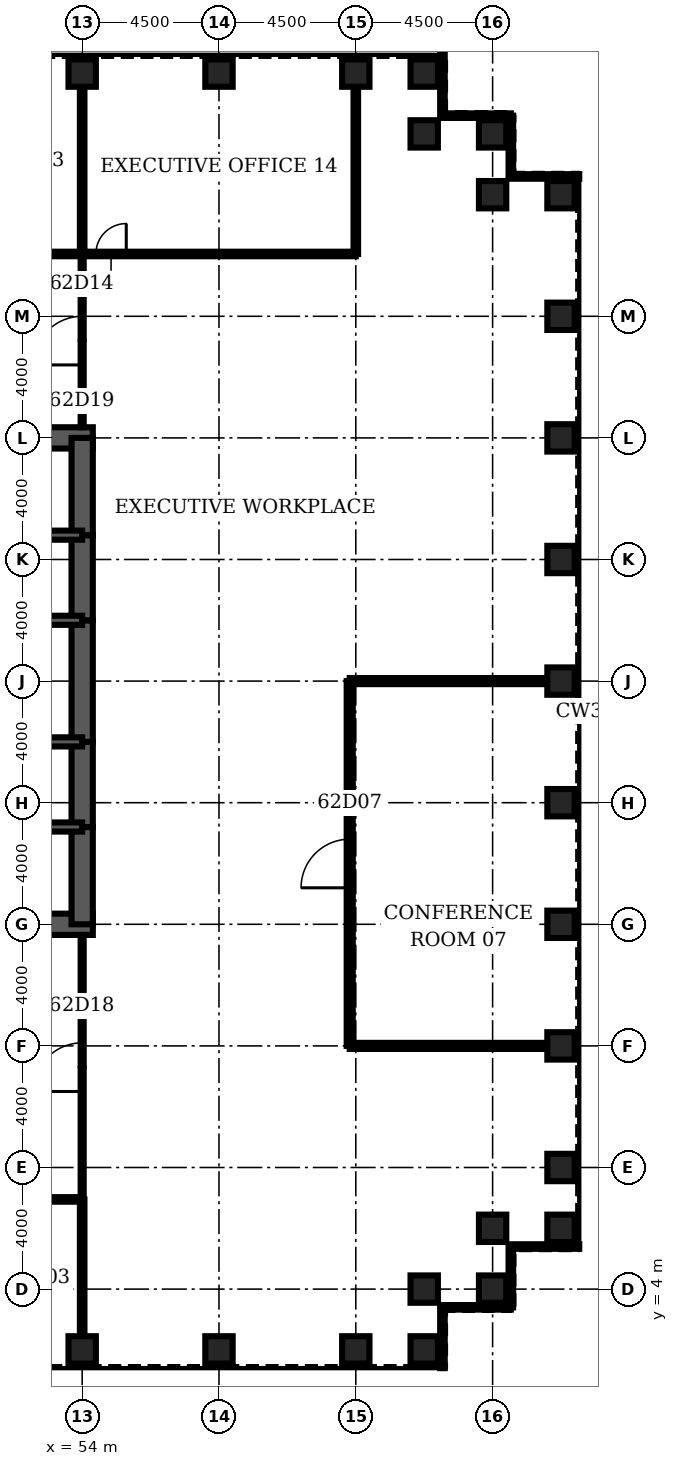
"""IFC4 building model, lengths in metres.
Left out: names, types, materials, properties, quantities, classifications, styles, units other than length and angle.
Written with IfcOpenShell. Run it as: python <this file> out.ifc"""

import sys

from ifc_helpers import new_model, si_unit, direction, frame, frame_2d, origin, origin_2d, place, context, subcontext, project, spatial, rectangle, hollow_rectangle, extrude, element, fill, save


model = new_model("IFC4")
c1 = context("Model", 3, precision=1e-05, world=origin(), true_north=direction((0.0, 1.0)))
c2 = subcontext(c1, "Body", "Model", "MODEL_VIEW")
j1 = project(units=[si_unit("LENGTHUNIT", "METRE"), si_unit("PLANEANGLEUNIT", "RADIAN")], contexts=[c1])
p1 = place(None, origin())
s1 = spatial("IfcSite", under=j1, at=p1, CompositionType="ELEMENT")
p2 = place(p1, origin())
s2 = spatial("IfcBuilding", under=s1, at=p2, CompositionType="ELEMENT")
p3 = place(p2, frame((0.0, 0.0, 275.3)))
s3 = spatial("IfcBuildingStorey", under=s2, at=p3, CompositionType="ELEMENT", Elevation=275.3)
for number, where, z_axis, x_axis in (
    (1, (54.0, 2.0, 0.0), (0.0, 0.0, 1.0), (0.0, 1.0, 0.0)),
    (2, (58.5, 2.0, 0.0), (0.0, 0.0, 1.0), (0.0, 1.0, 0.0)),
    (3, (63.0, 2.0, 0.0), (0.0, 0.0, 1.0), (0.0, 1.0, 0.0)),
    (4, (65.25, 2.0, 0.0), (0.0, 0.0, 1.0), (0.0, 1.0, 0.0)),
    (5, (65.25, 4.0, 0.0), (0.0, 0.0, 1.0), (0.0, 1.0, 0.0)),
    (6, (67.5, 4.0, 0.0), (0.0, 0.0, 1.0), (1.0, 0.0, 0.0)),
    (7, (67.5, 6.0, 0.0), (0.0, 0.0, 1.0), (1.0, 0.0, 0.0)),
    (8, (69.75, 6.0, 0.0), (0.0, 0.0, 1.0), (1.0, 0.0, 0.0)),
    (9, (69.75, 8.0, 0.0), (0.0, 0.0, 1.0), (1.0, 0.0, 0.0)),
    (10, (69.75, 12.0, 0.0), (0.0, 0.0, 1.0), (1.0, 0.0, 0.0)),
    (11, (69.75, 16.0, 0.0), (0.0, 0.0, 1.0), (1.0, 0.0, 0.0)),
    (12, (69.75, 20.0, 0.0), (0.0, 0.0, 1.0), (1.0, 0.0, 0.0)),
    (13, (69.75, 24.0, 0.0), (0.0, 0.0, 1.0), (1.0, 0.0, 0.0)),
    (14, (69.75, 28.0, 0.0), (0.0, 0.0, 1.0), (1.0, 0.0, 0.0)),
    (15, (69.75, 32.0, 0.0), (0.0, 0.0, 1.0), (1.0, 0.0, 0.0)),
    (16, (69.75, 36.0, 0.0), (0.0, 0.0, 1.0), (1.0, 0.0, 0.0)),
    (17, (69.75, 40.0, 0.0), (0.0, 0.0, 1.0), (1.0, 0.0, 0.0)),
    (18, (67.5, 40.0, 0.0), (0.0, 0.0, 1.0), (1.0, 0.0, 0.0)),
    (19, (67.5, 42.0, 0.0), (0.0, 0.0, 1.0), (1.0, 0.0, 0.0)),
    (20, (65.25, 42.0, 0.0), (0.0, 0.0, 1.0), (0.0, 1.0, 0.0)),
    (21, (65.25, 44.0, 0.0), (0.0, 0.0, 1.0), (0.0, 1.0, 0.0)),
    (22, (63.0, 44.0, 0.0), (0.0, 0.0, 1.0), (0.0, 1.0, 0.0)),
    (23, (58.5, 44.0, 0.0), (0.0, 0.0, 1.0), (0.0, 1.0, 0.0)),
    (24, (54.0, 44.0, 0.0), (0.0, 0.0, 1.0), (0.0, 1.0, 0.0)),
):
    element("IfcColumn", number, at=place(p3, frame(where, z_axis=z_axis, x_axis=x_axis)), inside=s3, PredefinedType="COLUMN", context=c2, shape_type="SweptSolid", body=[
        extrude(hollow_rectangle(XDim=0.9, YDim=0.9, WallThickness=0.07, at=origin_2d()), origin(), (0.0, 0.0, 1.0), 4.2),
    ])
for number, where, z_axis, x_axis in (
    (25, (45.0, 16.0, 0.0), (0.0, 0.0, 1.0), (1.0, 0.0, 0.0)),
    (26, (54.35, 32.0, 0.0), (0.0, 0.0, 1.0), (-1.0, 0.0, 0.0)),
):
    element("IfcWall", number, at=place(p3, frame(where, z_axis=z_axis, x_axis=x_axis)), inside=s3, PredefinedType="SHEAR", context=c2, shape_type="SweptSolid", body=[
        extrude(rectangle(XDim=9.35, YDim=0.7, at=frame_2d((4.675, 0.0))), origin(), (0.0, 0.0, 1.0), 4.2),
    ])
p4 = place(p3, frame((54.0, 16.0, 0.0), z_axis=(0.0, 0.0, 1.0), x_axis=(0.0, 1.0, 0.0)))
e27 = element("IfcWall", 27, at=p4, inside=s3, PredefinedType="SHEAR", context=c2, shape_type="SweptSolid", body=[
    extrude(rectangle(XDim=3.2, YDim=0.7, at=frame_2d((1.6, 0.0))), origin(), (0.0, 0.0, 1.0), 4.2),
])
p5 = place(p3, frame((54.0, 19.2, 0.0), z_axis=(0.0, 0.0, 1.0), x_axis=(0.0, 1.0, 0.0)))
e28 = element("IfcWall", 28, at=p5, inside=s3, PredefinedType="SHEAR", context=c2, shape_type="SweptSolid", body=[
    extrude(rectangle(XDim=2.8, YDim=0.7, at=frame_2d((1.4, 0.0))), origin(), (0.0, 0.0, 1.0), 4.2),
])
p6 = place(p5, frame((0.4, 0.0, 0.0)))
e29 = element("IfcOpeningElement", 29, at=p6, cuts=e28, PredefinedType="OPENING", context=c2, shape_type="SweptSolid", body=[
    extrude(rectangle(XDim=1.8, YDim=2.1, at=frame_2d((0.9, 1.05))), frame((0.0, 0.36, 0.0), z_axis=(0.0, -1.0, 0.0), x_axis=(1.0, 0.0, 0.0)), (0.0, 0.0, 1.0), 0.72),
])
p7 = place(p3, frame((54.0, 22.0, 0.0), z_axis=(0.0, 0.0, 1.0), x_axis=(0.0, 1.0, 0.0)))
e30 = element("IfcWall", 30, at=p7, inside=s3, PredefinedType="SHEAR", context=c2, shape_type="SweptSolid", body=[
    extrude(rectangle(XDim=4.0, YDim=0.7, at=frame_2d((2.0, 0.0))), origin(), (0.0, 0.0, 1.0), 4.2),
])
p8 = place(p3, frame((54.0, 26.0, 0.0), z_axis=(0.0, 0.0, 1.0), x_axis=(0.0, 1.0, 0.0)))
e31 = element("IfcWall", 31, at=p8, inside=s3, PredefinedType="SHEAR", context=c2, shape_type="SweptSolid", body=[
    extrude(rectangle(XDim=2.8, YDim=0.7, at=frame_2d((1.4, 0.0))), origin(), (0.0, 0.0, 1.0), 4.2),
])
p9 = place(p8, frame((0.6, 0.0, 0.0)))
e32 = element("IfcOpeningElement", 32, at=p9, cuts=e31, PredefinedType="OPENING", context=c2, shape_type="SweptSolid", body=[
    extrude(rectangle(XDim=1.8, YDim=2.1, at=frame_2d((0.9, 1.05))), frame((0.0, 0.36, 0.0), z_axis=(0.0, -1.0, 0.0), x_axis=(1.0, 0.0, 0.0)), (0.0, 0.0, 1.0), 0.72),
])
p10 = place(p3, frame((54.0, 28.8, 0.0), z_axis=(0.0, 0.0, 1.0), x_axis=(0.0, 1.0, 0.0)))
e33 = element("IfcWall", 33, at=p10, inside=s3, PredefinedType="SHEAR", context=c2, shape_type="SweptSolid", body=[
    extrude(rectangle(XDim=3.2, YDim=0.7, at=frame_2d((1.6, 0.0))), origin(), (0.0, 0.0, 1.0), 4.2),
])
p11 = place(p3, frame((45.0, 19.2, 0.0), z_axis=(0.0, 0.0, 1.0), x_axis=(1.0, 0.0, 0.0)))
e34 = element("IfcWall", 34, at=p11, inside=s3, PredefinedType="SOLIDWALL", context=c2, shape_type="SweptSolid", body=[
    extrude(rectangle(XDim=9.0, YDim=0.3, at=frame_2d((4.5, 0.0))), origin(), (0.0, 0.0, 1.0), 4.2),
])
p12 = place(p11, frame((7.35, 0.0, 0.0)))
e35 = element("IfcOpeningElement", 35, at=p12, cuts=e34, PredefinedType="OPENING", context=c2, shape_type="SweptSolid", body=[
    extrude(rectangle(XDim=1.0, YDim=2.1, at=frame_2d((0.5, 1.05))), frame((0.0, 0.16, 0.0), z_axis=(0.0, -1.0, 0.0), x_axis=(1.0, 0.0, 0.0)), (0.0, 0.0, 1.0), 0.32),
])
p13 = place(p3, frame((45.0, 28.8, 0.0), z_axis=(0.0, 0.0, 1.0), x_axis=(1.0, 0.0, 0.0)))
e36 = element("IfcWall", 36, at=p13, inside=s3, PredefinedType="SOLIDWALL", context=c2, shape_type="SweptSolid", body=[
    extrude(rectangle(XDim=9.0, YDim=0.3, at=frame_2d((4.5, 0.0))), origin(), (0.0, 0.0, 1.0), 4.2),
])
p14 = place(p13, frame((7.35, 0.0, 0.0)))
e37 = element("IfcOpeningElement", 37, at=p14, cuts=e36, PredefinedType="OPENING", context=c2, shape_type="SweptSolid", body=[
    extrude(rectangle(XDim=1.0, YDim=2.1, at=frame_2d((0.5, 1.05))), frame((0.0, 0.16, 0.0), z_axis=(0.0, -1.0, 0.0), x_axis=(1.0, 0.0, 0.0)), (0.0, 0.0, 1.0), 0.32),
])
p15 = place(p3, frame((48.0, 22.0, 0.0), z_axis=(0.0, 0.0, 1.0), x_axis=(1.0, 0.0, 0.0)))
e38 = element("IfcWall", 38, at=p15, inside=s3, PredefinedType="SOLIDWALL", context=c2, shape_type="SweptSolid", body=[
    extrude(rectangle(XDim=6.0, YDim=0.3, at=frame_2d((3.0, 0.0))), origin(), (0.0, 0.0, 1.0), 4.2),
])
p16 = place(p15, frame((2.0, 0.0, 0.0)))
e39 = element("IfcOpeningElement", 39, at=p16, cuts=e38, PredefinedType="OPENING", context=c2, shape_type="SweptSolid", body=[
    extrude(rectangle(XDim=1.0, YDim=2.1, at=frame_2d((0.5, 1.05))), frame((0.0, 0.16, 0.0), z_axis=(0.0, -1.0, 0.0), x_axis=(1.0, 0.0, 0.0)), (0.0, 0.0, 1.0), 0.32),
])
p17 = place(p15, frame((4.1, 0.0, 0.0)))
e40 = element("IfcOpeningElement", 40, at=p17, cuts=e38, PredefinedType="OPENING", context=c2, shape_type="SweptSolid", body=[
    extrude(rectangle(XDim=1.0, YDim=2.1, at=frame_2d((0.5, 1.05))), frame((0.0, 0.16, 0.0), z_axis=(0.0, -1.0, 0.0), x_axis=(1.0, 0.0, 0.0)), (0.0, 0.0, 1.0), 0.32),
])
p18 = place(p3, frame((48.0, 26.0, 0.0), z_axis=(0.0, 0.0, 1.0), x_axis=(1.0, 0.0, 0.0)))
e41 = element("IfcWall", 41, at=p18, inside=s3, PredefinedType="SOLIDWALL", context=c2, shape_type="SweptSolid", body=[
    extrude(rectangle(XDim=6.0, YDim=0.3, at=frame_2d((3.0, 0.0))), origin(), (0.0, 0.0, 1.0), 4.2),
])
p19 = place(p3, frame((49.5, 6.95, 0.0), z_axis=(0.0, 0.0, 1.0), x_axis=(1.0, 0.0, 0.0)))
e42 = element("IfcWall", 42, at=p19, inside=s3, PredefinedType="PARTITIONING", context=c2, shape_type="SweptSolid", body=[
    extrude(rectangle(XDim=4.5, YDim=0.15, at=frame_2d((2.25, 0.0))), origin(), (0.0, 0.0, 1.0), 3.0),
])
p20 = place(p19, frame((0.45, 0.0, 0.0)))
e43 = element("IfcOpeningElement", 43, at=p20, cuts=e42, PredefinedType="OPENING", context=c2, shape_type="SweptSolid", body=[
    extrude(rectangle(XDim=1.0, YDim=2.1, at=frame_2d((0.5, 1.05))), frame((0.0, 0.085, 0.0), z_axis=(0.0, -1.0, 0.0), x_axis=(1.0, 0.0, 0.0)), (0.0, 0.0, 1.0), 0.17),
])
for number, where, z_axis, x_axis in (
    (44, (62.8, 12.0, 0.0), (0.0, 0.0, 1.0), (1.0, 0.0, 0.0)),
    (45, (62.8, 24.0, 0.0), (0.0, 0.0, 1.0), (1.0, 0.0, 0.0)),
):
    element("IfcWall", number, at=place(p3, frame(where, z_axis=z_axis, x_axis=x_axis)), inside=s3, PredefinedType="PARTITIONING", context=c2, shape_type="SweptSolid", body=[
        extrude(rectangle(XDim=6.5, YDim=0.2, at=frame_2d((3.25, 0.0))), origin(), (0.0, 0.0, 1.0), 3.0),
    ])
p21 = place(p3, frame((9.0, 38.05, 0.0), z_axis=(0.0, 0.0, 1.0), x_axis=(1.0, 0.0, 0.0)))
e46 = element("IfcWall", 46, at=p21, inside=s3, PredefinedType="PARTITIONING", context=c2, shape_type="SweptSolid", body=[
    extrude(rectangle(XDim=54.0, YDim=0.15, at=frame_2d((27.0, 0.0))), origin(), (0.0, 0.0, 1.0), 3.0),
])
p22 = place(p21, frame((0.45, 0.0, 0.0)))
e47 = element("IfcOpeningElement", 47, at=p22, cuts=e46, PredefinedType="OPENING", context=c2, shape_type="SweptSolid", body=[
    extrude(rectangle(XDim=1.0, YDim=2.1, at=frame_2d((0.5, 1.05))), frame((0.0, 0.085, 0.0), z_axis=(0.0, -1.0, 0.0), x_axis=(1.0, 0.0, 0.0)), (0.0, 0.0, 1.0), 0.17),
])
p23 = place(p21, frame((9.45, 0.0, 0.0)))
e48 = element("IfcOpeningElement", 48, at=p23, cuts=e46, PredefinedType="OPENING", context=c2, shape_type="SweptSolid", body=[
    extrude(rectangle(XDim=1.0, YDim=2.1, at=frame_2d((0.5, 1.05))), frame((0.0, 0.085, 0.0), z_axis=(0.0, -1.0, 0.0), x_axis=(1.0, 0.0, 0.0)), (0.0, 0.0, 1.0), 0.17),
])
p24 = place(p21, frame((18.45, 0.0, 0.0)))
e49 = element("IfcOpeningElement", 49, at=p24, cuts=e46, PredefinedType="OPENING", context=c2, shape_type="SweptSolid", body=[
    extrude(rectangle(XDim=1.0, YDim=2.1, at=frame_2d((0.5, 1.05))), frame((0.0, 0.085, 0.0), z_axis=(0.0, -1.0, 0.0), x_axis=(1.0, 0.0, 0.0)), (0.0, 0.0, 1.0), 0.17),
])
p25 = place(p21, frame((27.45, 0.0, 0.0)))
e50 = element("IfcOpeningElement", 50, at=p25, cuts=e46, PredefinedType="OPENING", context=c2, shape_type="SweptSolid", body=[
    extrude(rectangle(XDim=1.0, YDim=2.1, at=frame_2d((0.5, 1.05))), frame((0.0, 0.085, 0.0), z_axis=(0.0, -1.0, 0.0), x_axis=(1.0, 0.0, 0.0)), (0.0, 0.0, 1.0), 0.17),
])
p26 = place(p21, frame((36.45, 0.0, 0.0)))
e51 = element("IfcOpeningElement", 51, at=p26, cuts=e46, PredefinedType="OPENING", context=c2, shape_type="SweptSolid", body=[
    extrude(rectangle(XDim=1.0, YDim=2.1, at=frame_2d((0.5, 1.05))), frame((0.0, 0.085, 0.0), z_axis=(0.0, -1.0, 0.0), x_axis=(1.0, 0.0, 0.0)), (0.0, 0.0, 1.0), 0.17),
])
p27 = place(p21, frame((45.45, 0.0, 0.0)))
e52 = element("IfcOpeningElement", 52, at=p27, cuts=e46, PredefinedType="OPENING", context=c2, shape_type="SweptSolid", body=[
    extrude(rectangle(XDim=1.0, YDim=2.1, at=frame_2d((0.5, 1.05))), frame((0.0, 0.085, 0.0), z_axis=(0.0, -1.0, 0.0), x_axis=(1.0, 0.0, 0.0)), (0.0, 0.0, 1.0), 0.17),
])
p28 = place(p3, frame((54.0, 2.45, 0.0), z_axis=(0.0, 0.0, 1.0), x_axis=(0.0, 1.0, 0.0)))
e53 = element("IfcWall", 53, at=p28, inside=s3, PredefinedType="PARTITIONING", context=c2, shape_type="SweptSolid", body=[
    extrude(rectangle(XDim=4.5, YDim=0.15, at=frame_2d((2.25, 0.0))), origin(), (0.0, 0.0, 1.0), 3.0),
])
p29 = place(p3, frame((54.0, 6.95, 0.0), z_axis=(0.0, 0.0, 1.0), x_axis=(0.0, 1.0, 0.0)))
e54 = element("IfcWall", 54, at=p29, inside=s3, PredefinedType="PARTITIONING", context=c2, shape_type="SweptSolid", body=[
    extrude(rectangle(XDim=8.7, YDim=0.1, at=frame_2d((4.35, 0.0))), origin(), (0.0, 0.0, 1.0), 3.0),
])
p30 = place(p29, frame((3.55, 0.0, 0.0)))
e55 = element("IfcOpeningElement", 55, at=p30, cuts=e54, PredefinedType="OPENING", context=c2, shape_type="SweptSolid", body=[
    extrude(rectangle(XDim=1.6, YDim=2.1, at=frame_2d((0.8, 1.05))), frame((0.0, 0.06, 0.0), z_axis=(0.0, -1.0, 0.0), x_axis=(1.0, 0.0, 0.0)), (0.0, 0.0, 1.0), 0.12),
])
p31 = place(p3, frame((54.0, 32.35, 0.0), z_axis=(0.0, 0.0, 1.0), x_axis=(0.0, 1.0, 0.0)))
e56 = element("IfcWall", 56, at=p31, inside=s3, PredefinedType="PARTITIONING", context=c2, shape_type="SweptSolid", body=[
    extrude(rectangle(XDim=5.7, YDim=0.1, at=frame_2d((2.85, 0.0))), origin(), (0.0, 0.0, 1.0), 3.0),
])
p32 = place(p31, frame((2.05, 0.0, 0.0)))
e57 = element("IfcOpeningElement", 57, at=p32, cuts=e56, PredefinedType="OPENING", context=c2, shape_type="SweptSolid", body=[
    extrude(rectangle(XDim=1.6, YDim=2.1, at=frame_2d((0.8, 1.05))), frame((0.0, 0.06, 0.0), z_axis=(0.0, -1.0, 0.0), x_axis=(1.0, 0.0, 0.0)), (0.0, 0.0, 1.0), 0.12),
])
p33 = place(p3, frame((54.0, 38.05, 0.0), z_axis=(0.0, 0.0, 1.0), x_axis=(0.0, 1.0, 0.0)))
e58 = element("IfcWall", 58, at=p33, inside=s3, PredefinedType="PARTITIONING", context=c2, shape_type="SweptSolid", body=[
    extrude(rectangle(XDim=5.5, YDim=0.15, at=frame_2d((2.75, 0.0))), origin(), (0.0, 0.0, 1.0), 3.0),
])
p34 = place(p3, frame((62.8, 12.0, 0.0), z_axis=(0.0, 0.0, 1.0), x_axis=(0.0, 1.0, 0.0)))
e59 = element("IfcWall", 59, at=p34, inside=s3, PredefinedType="PARTITIONING", context=c2, shape_type="SweptSolid", body=[
    extrude(rectangle(XDim=12.0, YDim=0.2, at=frame_2d((6.0, 0.0))), origin(), (0.0, 0.0, 1.0), 3.0),
])
p35 = place(p34, frame((5.2, 0.0, 0.0)))
e60 = element("IfcOpeningElement", 60, at=p35, cuts=e59, PredefinedType="OPENING", context=c2, shape_type="SweptSolid", body=[
    extrude(rectangle(XDim=1.6, YDim=2.1, at=frame_2d((0.8, 1.05))), frame((0.0, 0.11, 0.0), z_axis=(0.0, -1.0, 0.0), x_axis=(1.0, 0.0, 0.0)), (0.0, 0.0, 1.0), 0.22),
])
p36 = place(p3, frame((63.0, 38.05, 0.0), z_axis=(0.0, 0.0, 1.0), x_axis=(0.0, 1.0, 0.0)))
e61 = element("IfcWall", 61, at=p36, inside=s3, PredefinedType="PARTITIONING", context=c2, shape_type="SweptSolid", body=[
    extrude(rectangle(XDim=5.5, YDim=0.15, at=frame_2d((2.75, 0.0))), origin(), (0.0, 0.0, 1.0), 3.0),
])
p37 = place(p3, frame((65.85, 1.4, 0.0), z_axis=(0.0, 0.0, 1.0), x_axis=(0.0, 1.0, 0.0)))
e62 = element("IfcWall", 62, at=p37, inside=s3, PredefinedType="ELEMENTEDWALL", context=c2, shape_type="SweptSolid", body=[
    extrude(rectangle(XDim=2.0, YDim=0.15, at=frame_2d((1.0, 0.0))), origin(), (0.0, 0.0, 1.0), 4.04),
])
p38 = place(p3, frame((65.85, 3.4, 0.0), z_axis=(0.0, 0.0, 1.0), x_axis=(1.0, 0.0, 0.0)))
e63 = element("IfcWall", 63, at=p38, inside=s3, PredefinedType="ELEMENTEDWALL", context=c2, shape_type="SweptSolid", body=[
    extrude(rectangle(XDim=2.25, YDim=0.15, at=frame_2d((1.125, 0.0))), origin(), (0.0, 0.0, 1.0), 4.04),
])
p39 = place(p3, frame((68.1, 3.4, 0.0), z_axis=(0.0, 0.0, 1.0), x_axis=(0.0, 1.0, 0.0)))
e64 = element("IfcWall", 64, at=p39, inside=s3, PredefinedType="ELEMENTEDWALL", context=c2, shape_type="SweptSolid", body=[
    extrude(rectangle(XDim=2.0, YDim=0.15, at=frame_2d((1.0, 0.0))), origin(), (0.0, 0.0, 1.0), 4.04),
])
for number, where, z_axis, x_axis in (
    (65, (68.1, 5.4, 0.0), (0.0, 0.0, 1.0), (1.0, 0.0, 0.0)),
    (66, (70.35, 40.6, 0.0), (0.0, 0.0, 1.0), (-1.0, 0.0, 0.0)),
):
    element("IfcWall", number, at=place(p3, frame(where, z_axis=z_axis, x_axis=x_axis)), inside=s3, PredefinedType="ELEMENTEDWALL", context=c2, shape_type="SweptSolid", body=[
        extrude(rectangle(XDim=2.25, YDim=0.15, at=frame_2d((1.125, 0.0))), origin(), (0.0, 0.0, 1.0), 4.04),
    ])
p40 = place(p3, frame((68.1, 40.6, 0.0), z_axis=(0.0, 0.0, 1.0), x_axis=(0.0, 1.0, 0.0)))
e67 = element("IfcWall", 67, at=p40, inside=s3, PredefinedType="ELEMENTEDWALL", context=c2, shape_type="SweptSolid", body=[
    extrude(rectangle(XDim=2.0, YDim=0.15, at=frame_2d((1.0, 0.0))), origin(), (0.0, 0.0, 1.0), 4.04),
])
p41 = place(p3, frame((68.1, 42.6, 0.0), z_axis=(0.0, 0.0, 1.0), x_axis=(-1.0, 0.0, 0.0)))
e68 = element("IfcWall", 68, at=p41, inside=s3, PredefinedType="ELEMENTEDWALL", context=c2, shape_type="SweptSolid", body=[
    extrude(rectangle(XDim=2.25, YDim=0.15, at=frame_2d((1.125, 0.0))), origin(), (0.0, 0.0, 1.0), 4.04),
])
p42 = place(p3, frame((65.85, 42.6, 0.0), z_axis=(0.0, 0.0, 1.0), x_axis=(0.0, 1.0, 0.0)))
e69 = element("IfcWall", 69, at=p42, inside=s3, PredefinedType="ELEMENTEDWALL", context=c2, shape_type="SweptSolid", body=[
    extrude(rectangle(XDim=2.0, YDim=0.15, at=frame_2d((1.0, 0.0))), origin(), (0.0, 0.0, 1.0), 4.04),
])
p43 = place(p35, origin())
e70 = element("IfcDoor", 70, at=p43, inside=s3, OperationType="SINGLE_SWING_LEFT", PredefinedType="DOOR", context=c2, shape_type="SweptSolid", body=[
    extrude(rectangle(XDim=1.6, YDim=2.1, at=frame_2d((0.8, 1.05))), frame((0.0, 0.025, 0.0), z_axis=(0.0, -1.0, 0.0), x_axis=(1.0, 0.0, 0.0)), (0.0, 0.0, 1.0), 0.05),
])
fill(e60, e70)
p44 = place(p27, origin())
e71 = element("IfcDoor", 71, at=p44, inside=s3, OperationType="SINGLE_SWING_RIGHT", PredefinedType="DOOR", context=c2, shape_type="SweptSolid", body=[
    extrude(rectangle(XDim=1.0, YDim=2.1, at=frame_2d((0.5, 1.05))), frame((0.0, 0.025, 0.0), z_axis=(0.0, -1.0, 0.0), x_axis=(1.0, 0.0, 0.0)), (0.0, 0.0, 1.0), 0.05),
])
fill(e52, e71)
p45 = place(p30, origin())
e72 = element("IfcDoor", 72, at=p45, inside=s3, OperationType="SINGLE_SWING_LEFT", PredefinedType="DOOR", context=c2, shape_type="SweptSolid", body=[
    extrude(rectangle(XDim=1.6, YDim=2.1, at=frame_2d((0.8, 1.05))), frame((0.0, 0.025, 0.0), z_axis=(0.0, -1.0, 0.0), x_axis=(1.0, 0.0, 0.0)), (0.0, 0.0, 1.0), 0.05),
])
fill(e55, e72)
p46 = place(p32, origin())
e73 = element("IfcDoor", 73, at=p46, inside=s3, OperationType="SINGLE_SWING_LEFT", PredefinedType="DOOR", context=c2, shape_type="SweptSolid", body=[
    extrude(rectangle(XDim=1.6, YDim=2.1, at=frame_2d((0.8, 1.05))), frame((0.0, 0.025, 0.0), z_axis=(0.0, -1.0, 0.0), x_axis=(1.0, 0.0, 0.0)), (0.0, 0.0, 1.0), 0.05),
])
fill(e57, e73)
p47 = place(p12, origin())
e74 = element("IfcDoor", 74, at=p47, inside=s3, OperationType="SINGLE_SWING_RIGHT", PredefinedType="DOOR", context=c2, shape_type="SweptSolid", body=[
    extrude(rectangle(XDim=1.0, YDim=2.1, at=frame_2d((0.5, 1.05))), frame((0.0, 0.025, 0.0), z_axis=(0.0, -1.0, 0.0), x_axis=(1.0, 0.0, 0.0)), (0.0, 0.0, 1.0), 0.05),
])
fill(e35, e74)
p48 = place(p14, origin())
e75 = element("IfcDoor", 75, at=p48, inside=s3, OperationType="SINGLE_SWING_RIGHT", PredefinedType="DOOR", context=c2, shape_type="SweptSolid", body=[
    extrude(rectangle(XDim=1.0, YDim=2.1, at=frame_2d((0.5, 1.05))), frame((0.0, 0.025, 0.0), z_axis=(0.0, -1.0, 0.0), x_axis=(1.0, 0.0, 0.0)), (0.0, 0.0, 1.0), 0.05),
])
fill(e37, e75)
p49 = place(p6, origin())
e76 = element("IfcDoor", 76, at=p49, inside=s3, OperationType="SINGLE_SWING_LEFT", PredefinedType="DOOR", context=c2, shape_type="SweptSolid", body=[
    extrude(rectangle(XDim=1.8, YDim=2.1, at=frame_2d((0.9, 1.05))), frame((0.0, 0.35, 0.0), z_axis=(0.0, -1.0, 0.0), x_axis=(1.0, 0.0, 0.0)), (0.0, 0.0, 1.0), 0.699),
])
fill(e29, e76)
p50 = place(p9, origin())
e77 = element("IfcDoor", 77, at=p50, inside=s3, OperationType="SINGLE_SWING_LEFT", PredefinedType="DOOR", context=c2, shape_type="SweptSolid", body=[
    extrude(rectangle(XDim=1.8, YDim=2.1, at=frame_2d((0.9, 1.05))), frame((0.0, 0.35, 0.0), z_axis=(0.0, -1.0, 0.0), x_axis=(1.0, 0.0, 0.0)), (0.0, 0.0, 1.0), 0.699),
])
fill(e32, e77)
p51 = place(p17, origin())
e78 = element("IfcDoor", 78, at=p51, inside=s3, OperationType="SINGLE_SWING_RIGHT", PredefinedType="DOOR", context=c2, shape_type="SweptSolid", body=[
    extrude(rectangle(XDim=1.0, YDim=2.1, at=frame_2d((0.5, 1.05))), frame((0.0, 0.025, 0.0), z_axis=(0.0, -1.0, 0.0), x_axis=(1.0, 0.0, 0.0)), (0.0, 0.0, 1.0), 0.05),
])
fill(e40, e78)
save(model, sys.argv[1])
